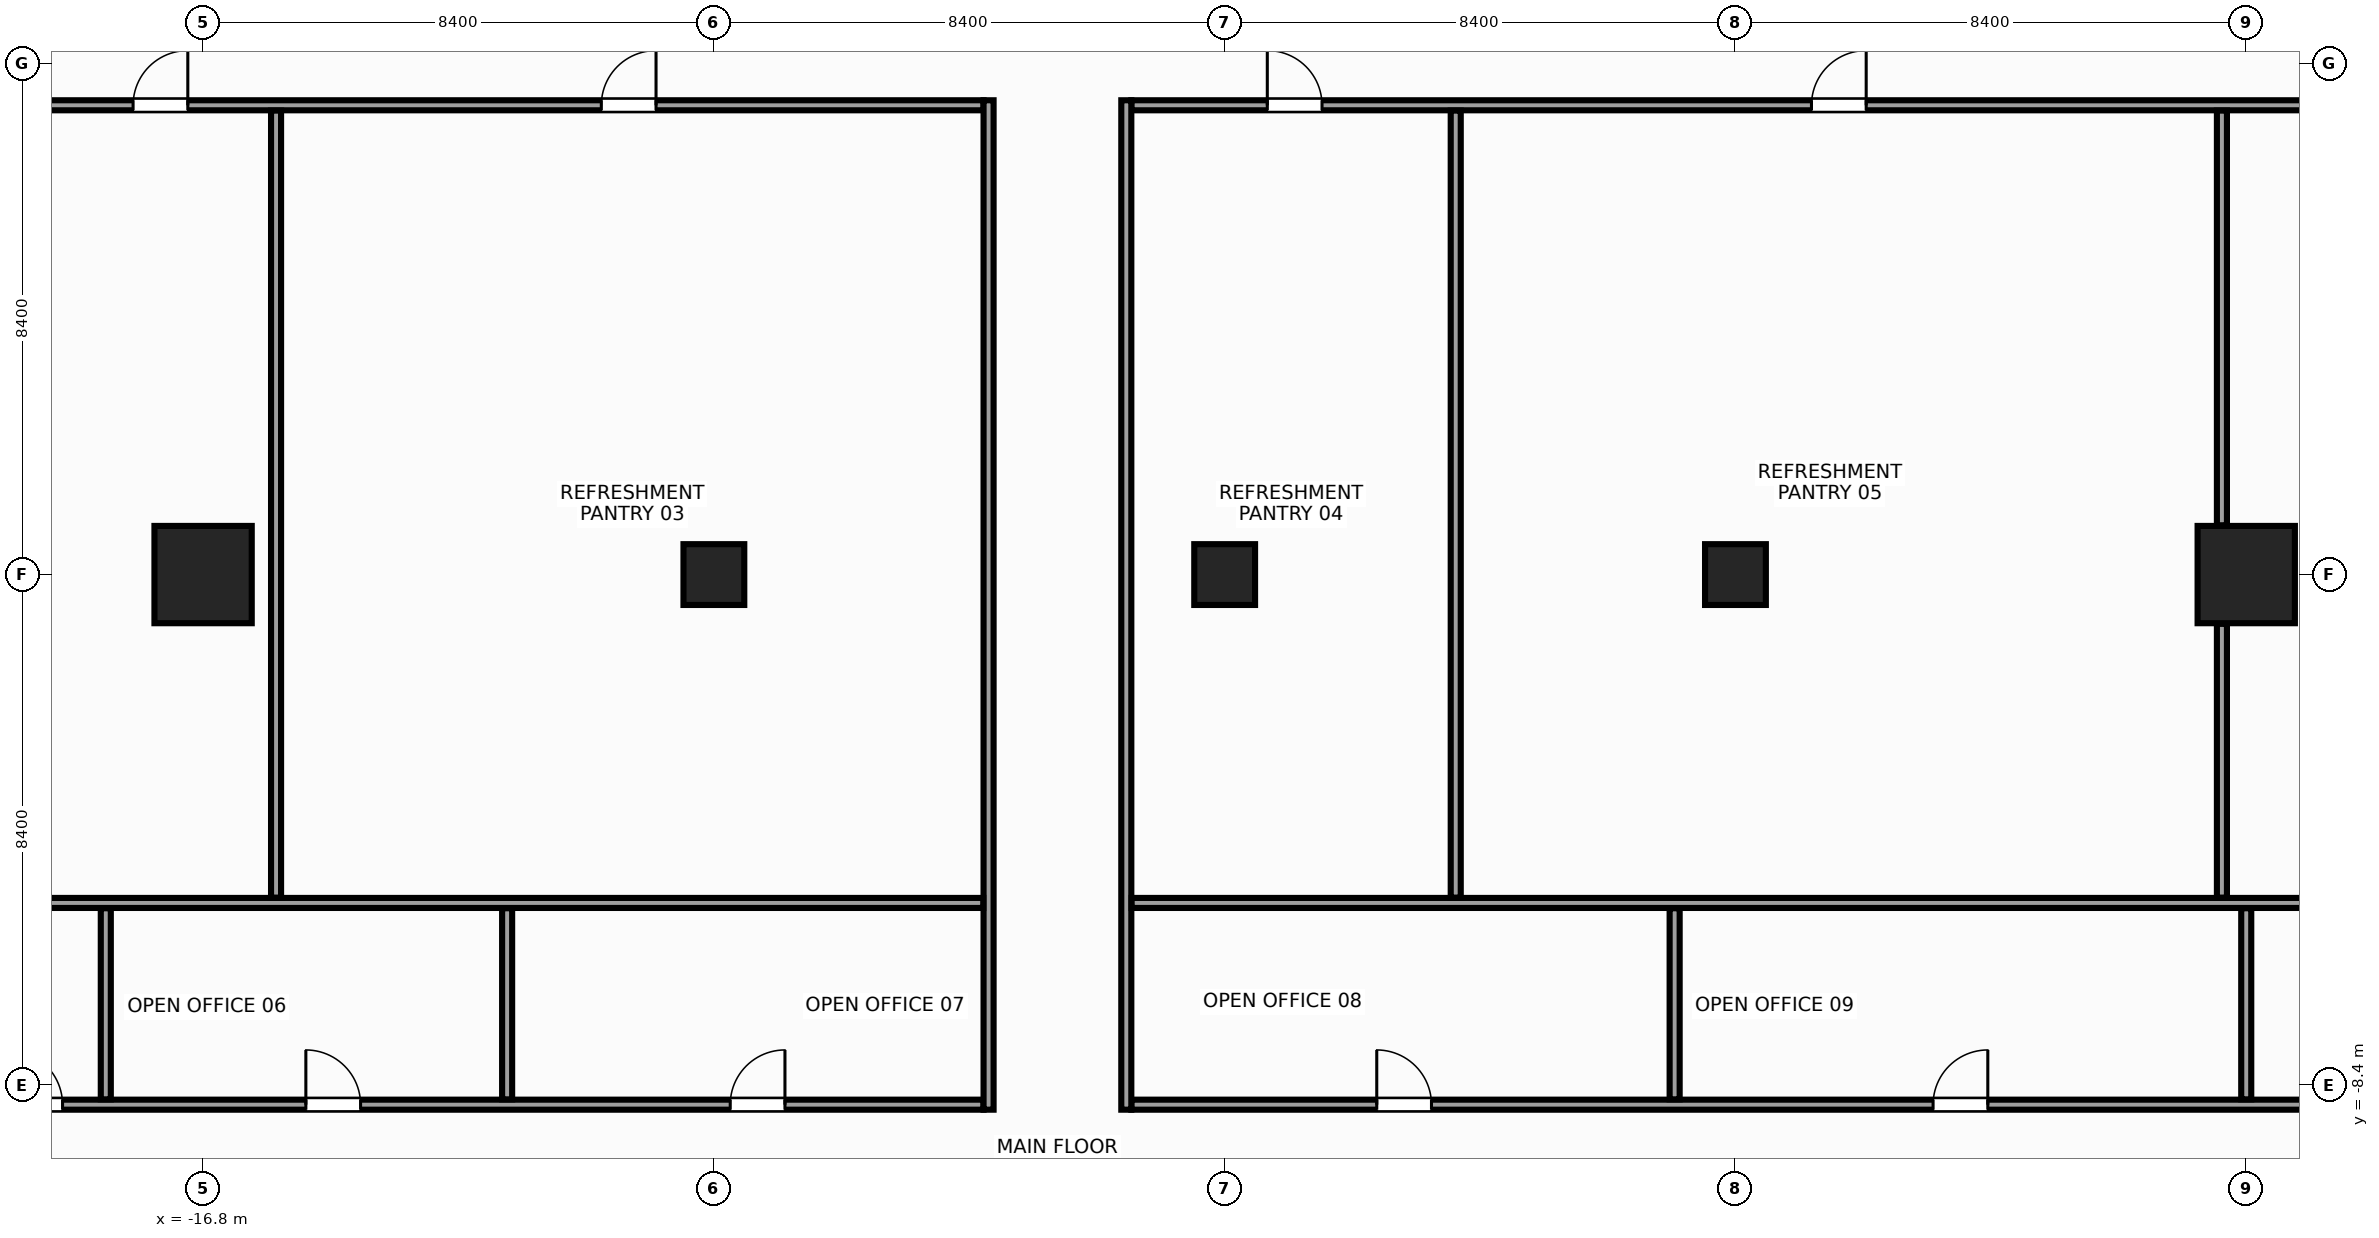
"""IFC4 building model, lengths in metres.
Left out: names, types, materials, properties, quantities, classifications, styles, units other than length and angle.
Written with IfcOpenShell. Run it as: python <this file> out.ifc"""

import sys

from ifc_helpers import new_model, si_unit, direction, frame, frame_2d, origin, origin_with_axes, origin_2d, place, context, subcontext, project, spatial, rectangle, hollow_rectangle, extrude, source, transform, mapped, element, fill, save


model = new_model("IFC4")
c1 = context("Model", 3, precision=1e-05, world=origin(), true_north=direction((0.0, 1.0)))
c2 = subcontext(c1, "Body", "Model", "MODEL_VIEW")
j1 = project(units=[si_unit("LENGTHUNIT", "METRE"), si_unit("PLANEANGLEUNIT", "RADIAN")], contexts=[c1])
p1 = place(None, origin())
s1 = spatial("IfcSite", under=j1, at=p1, CompositionType="ELEMENT")
p2 = place(p1, origin())
s2 = spatial("IfcBuilding", under=s1, at=p2, CompositionType="ELEMENT")
p3 = place(p2, frame((0.0, 0.0, 110.0)))
s3 = spatial("IfcBuildingStorey", under=s2, at=p3, CompositionType="ELEMENT", Elevation=110.0)
m1 = source(origin(), c2, "Body", "SweptSolid", [
    extrude(rectangle(XDim=1.6, YDim=1.6, at=origin_2d()), origin(), (0.0, 0.0, 1.0), 3.6),
])
for number, where, z_axis, x_axis in (
    (1, (-16.8, 0.0, 0.0), (0.0, 0.0, 1.0), (1.0, 0.0, 0.0)),
    (2, (16.8, 0.0, 0.0), (0.0, 0.0, 1.0), (1.0, 0.0, 0.0)),
):
    element("IfcColumn", number, at=place(p3, frame(where, z_axis=z_axis, x_axis=x_axis)), inside=s3, PredefinedType="COLUMN", context=c2, shape_type="MappedRepresentation", body=[
        mapped(m1, transform((0.0, 0.0, 0.0), x_axis=(1.0, 0.0, 0.0), y_axis=(0.0, 1.0, 0.0), z_axis=(0.0, 0.0, 1.0), scale=1.0)),
    ])
m2 = source(origin(), c2, "Body", "SweptSolid", [
    extrude(hollow_rectangle(XDim=1.0, YDim=1.0, WallThickness=0.045, at=origin_2d()), origin(), (0.0, 0.0, 1.0), 3.6),
])
for number, where, z_axis, x_axis in (
    (3, (-8.4, 0.0, 0.0), (0.0, 0.0, 1.0), (1.0, 0.0, 0.0)),
    (4, (8.4, 0.0, 0.0), (0.0, 0.0, 1.0), (1.0, 0.0, 0.0)),
):
    element("IfcColumn", number, at=place(p3, frame(where, z_axis=z_axis, x_axis=x_axis)), inside=s3, PredefinedType="COLUMN", context=c2, shape_type="MappedRepresentation", body=[
        mapped(m2, transform((0.0, 0.0, 0.0), x_axis=(1.0, 0.0, 0.0), y_axis=(0.0, 1.0, 0.0), z_axis=(0.0, 0.0, 1.0), scale=1.0)),
    ])
m3 = source(origin(), c2, "Body", "SweptSolid", [
    extrude(rectangle(XDim=1.0, YDim=1.0, at=origin_2d()), origin(), (0.0, 0.0, 1.0), 3.6),
])
p4 = place(p3, origin_with_axes())
e5 = element("IfcColumn", 5, at=p4, inside=s3, PredefinedType="COLUMN", context=c2, shape_type="MappedRepresentation", body=[
    mapped(m3, transform((0.0, 0.0, 0.0), x_axis=(1.0, 0.0, 0.0), y_axis=(0.0, 1.0, 0.0), z_axis=(0.0, 0.0, 1.0), scale=1.0)),
])
m4 = source(origin(), c2, "Body", "SweptSolid", [
    extrude(rectangle(XDim=16.8, YDim=0.165, at=frame_2d((8.4, 0.0))), origin(), (0.0, 0.0, 1.0), 2.745),
])
p5 = place(p3, frame((-20.765, 7.718, 0.0), z_axis=(0.0, 0.0, 1.0), x_axis=(1.0, 0.0, 0.0)))
e6 = element("IfcWall", 6, at=p5, inside=s3, PredefinedType="PARTITIONING", context=c2, shape_type="MappedRepresentation", body=[
    mapped(m4, transform((0.0, 0.0, 0.0), x_axis=(1.0, 0.0, 0.0), y_axis=(0.0, 1.0, 0.0), z_axis=(0.0, 0.0, 1.0), scale=1.0)),
])
p6 = place(p5, frame((2.814, 0.0, 0.0)))
e7 = element("IfcOpeningElement", 7, at=p6, cuts=e6, PredefinedType="OPENING", context=c2, shape_type="SweptSolid", body=[
    extrude(rectangle(XDim=0.9, YDim=2.15, at=frame_2d((0.45, 1.075))), frame((0.0, 0.094, 0.0), z_axis=(0.0, -1.0, 0.0), x_axis=(1.0, 0.0, 0.0)), (0.0, 0.0, 1.0), 0.189),
])
p7 = place(p5, frame((10.514, 0.0, 0.0)))
e8 = element("IfcOpeningElement", 8, at=p7, cuts=e6, PredefinedType="OPENING", context=c2, shape_type="SweptSolid", body=[
    extrude(rectangle(XDim=0.9, YDim=2.15, at=frame_2d((0.45, 1.075))), frame((0.0, 0.094, 0.0), z_axis=(0.0, -1.0, 0.0), x_axis=(1.0, 0.0, 0.0)), (0.0, 0.0, 1.0), 0.189),
])
m5 = source(origin(), c2, "Body", "SweptSolid", [
    extrude(rectangle(XDim=22.3, YDim=0.165, at=frame_2d((11.15, 0.0))), origin(), (0.0, 0.0, 1.0), 2.745),
])
p8 = place(p3, frame((-1.535, 7.718, 0.0), z_axis=(0.0, 0.0, 1.0), x_axis=(1.0, 0.0, 0.0)))
e9 = element("IfcWall", 9, at=p8, inside=s3, PredefinedType="PARTITIONING", context=c2, shape_type="MappedRepresentation", body=[
    mapped(m5, transform((0.0, 0.0, 0.0), x_axis=(1.0, 0.0, 0.0), y_axis=(0.0, 1.0, 0.0), z_axis=(0.0, 0.0, 1.0), scale=1.0)),
])
p9 = place(p8, frame((19.646, 0.0, 0.0)))
e10 = element("IfcOpeningElement", 10, at=p9, cuts=e9, PredefinedType="OPENING", context=c2, shape_type="SweptSolid", body=[
    extrude(rectangle(XDim=0.9, YDim=2.15, at=frame_2d((0.45, 1.075))), frame((0.0, 0.094, 0.0), z_axis=(0.0, -1.0, 0.0), x_axis=(1.0, 0.0, 0.0)), (0.0, 0.0, 1.0), 0.189),
])
p10 = place(p8, frame((2.236, 0.0, 0.0)))
e11 = element("IfcOpeningElement", 11, at=p10, cuts=e9, PredefinedType="OPENING", context=c2, shape_type="SweptSolid", body=[
    extrude(rectangle(XDim=0.9, YDim=2.15, at=frame_2d((0.45, 1.075))), frame((0.0, 0.094, 0.0), z_axis=(0.0, -1.0, 0.0), x_axis=(1.0, 0.0, 0.0)), (0.0, 0.0, 1.0), 0.189),
])
p11 = place(p8, frame((11.185, 0.0, 0.0)))
e12 = element("IfcOpeningElement", 12, at=p11, cuts=e9, PredefinedType="OPENING", context=c2, shape_type="SweptSolid", body=[
    extrude(rectangle(XDim=0.9, YDim=2.15, at=frame_2d((0.45, 1.075))), frame((0.0, 0.094, 0.0), z_axis=(0.0, -1.0, 0.0), x_axis=(1.0, 0.0, 0.0)), (0.0, 0.0, 1.0), 0.189),
])
p12 = place(p3, frame((-20.765, -8.718, 0.0), z_axis=(0.0, 0.0, 1.0), x_axis=(1.0, 0.0, 0.0)))
e13 = element("IfcWall", 13, at=p12, inside=s3, PredefinedType="PARTITIONING", context=c2, shape_type="MappedRepresentation", body=[
    mapped(m4, transform((0.0, 0.0, 0.0), x_axis=(1.0, 0.0, 0.0), y_axis=(0.0, 1.0, 0.0), z_axis=(0.0, 0.0, 1.0), scale=1.0)),
])
p13 = place(p12, frame((5.655, 0.0, 0.0)))
e14 = element("IfcOpeningElement", 14, at=p13, cuts=e13, PredefinedType="OPENING", context=c2, shape_type="SweptSolid", body=[
    extrude(rectangle(XDim=0.9, YDim=2.15, at=frame_2d((0.45, 1.075))), frame((0.0, 0.094, 0.0), z_axis=(0.0, -1.0, 0.0), x_axis=(1.0, 0.0, 0.0)), (0.0, 0.0, 1.0), 0.189),
])
p14 = place(p12, frame((12.634, 0.0, 0.0)))
e15 = element("IfcOpeningElement", 15, at=p14, cuts=e13, PredefinedType="OPENING", context=c2, shape_type="SweptSolid", body=[
    extrude(rectangle(XDim=0.9, YDim=2.15, at=frame_2d((0.45, 1.075))), frame((0.0, 0.094, 0.0), z_axis=(0.0, -1.0, 0.0), x_axis=(1.0, 0.0, 0.0)), (0.0, 0.0, 1.0), 0.189),
])
p15 = place(p12, frame((0.754, 0.0, 0.0)))
e16 = element("IfcOpeningElement", 16, at=p15, cuts=e13, PredefinedType="OPENING", context=c2, shape_type="SweptSolid", body=[
    extrude(rectangle(XDim=0.9, YDim=2.15, at=frame_2d((0.45, 1.075))), frame((0.0, 0.094, 0.0), z_axis=(0.0, -1.0, 0.0), x_axis=(1.0, 0.0, 0.0)), (0.0, 0.0, 1.0), 0.189),
])
p16 = place(p3, frame((-1.535, -8.718, 0.0), z_axis=(0.0, 0.0, 1.0), x_axis=(1.0, 0.0, 0.0)))
e17 = element("IfcWall", 17, at=p16, inside=s3, PredefinedType="PARTITIONING", context=c2, shape_type="MappedRepresentation", body=[
    mapped(m5, transform((0.0, 0.0, 0.0), x_axis=(1.0, 0.0, 0.0), y_axis=(0.0, 1.0, 0.0), z_axis=(0.0, 0.0, 1.0), scale=1.0)),
])
p17 = place(p16, frame((4.036, 0.0, 0.0)))
e18 = element("IfcOpeningElement", 18, at=p17, cuts=e17, PredefinedType="OPENING", context=c2, shape_type="SweptSolid", body=[
    extrude(rectangle(XDim=0.9, YDim=2.15, at=frame_2d((0.45, 1.075))), frame((0.0, 0.094, 0.0), z_axis=(0.0, -1.0, 0.0), x_axis=(1.0, 0.0, 0.0)), (0.0, 0.0, 1.0), 0.189),
])
p18 = place(p16, frame((13.185, 0.0, 0.0)))
e19 = element("IfcOpeningElement", 19, at=p18, cuts=e17, PredefinedType="OPENING", context=c2, shape_type="SweptSolid", body=[
    extrude(rectangle(XDim=0.9, YDim=2.15, at=frame_2d((0.45, 1.075))), frame((0.0, 0.094, 0.0), z_axis=(0.0, -1.0, 0.0), x_axis=(1.0, 0.0, 0.0)), (0.0, 0.0, 1.0), 0.189),
])
p19 = place(p16, frame((19.846, 0.0, 0.0)))
e20 = element("IfcOpeningElement", 20, at=p19, cuts=e17, PredefinedType="OPENING", context=c2, shape_type="SweptSolid", body=[
    extrude(rectangle(XDim=0.9, YDim=2.15, at=frame_2d((0.45, 1.075))), frame((0.0, 0.094, 0.0), z_axis=(0.0, -1.0, 0.0), x_axis=(1.0, 0.0, 0.0)), (0.0, 0.0, 1.0), 0.189),
])
m6 = source(origin(), c2, "Body", "SweptSolid", [
    extrude(rectangle(XDim=16.6, YDim=0.165, at=frame_2d((8.3, 0.0))), origin(), (0.0, 0.0, 1.0), 2.645),
])
for number, where, z_axis, x_axis in (
    (21, (-3.883, -8.8, 0.0), (0.0, 0.0, 1.0), (0.0, 1.0, 0.0)),
    (22, (-1.617, -8.8, 0.0), (0.0, 0.0, 1.0), (0.0, 1.0, 0.0)),
):
    element("IfcWall", number, at=place(p3, frame(where, z_axis=z_axis, x_axis=x_axis)), inside=s3, PredefinedType="PARTITIONING", context=c2, shape_type="MappedRepresentation", body=[
        mapped(m6, transform((0.0, 0.0, 0.0), x_axis=(1.0, 0.0, 0.0), y_axis=(0.0, 1.0, 0.0), z_axis=(0.0, 0.0, 1.0), scale=1.0)),
    ])
m7 = source(origin(), c2, "Body", "SweptSolid", [
    extrude(rectangle(XDim=21.38, YDim=0.165, at=frame_2d((10.69, 0.0))), origin(), (0.0, 0.0, 1.0), 2.745),
])
p20 = place(p3, frame((-25.35, -5.4, 0.0), z_axis=(0.0, 0.0, 1.0), x_axis=(1.0, 0.0, 0.0)))
e23 = element("IfcWall", 23, at=p20, inside=s3, PredefinedType="PARTITIONING", context=c2, shape_type="MappedRepresentation", body=[
    mapped(m7, transform((0.0, 0.0, 0.0), x_axis=(1.0, 0.0, 0.0), y_axis=(0.0, 1.0, 0.0), z_axis=(0.0, 0.0, 1.0), scale=1.0)),
])
m8 = source(origin(), c2, "Body", "SweptSolid", [
    extrude(rectangle(XDim=26.88, YDim=0.165, at=frame_2d((13.44, 0.0))), origin(), (0.0, 0.0, 1.0), 2.745),
])
p21 = place(p3, frame((-1.53, -5.4, 0.0), z_axis=(0.0, 0.0, 1.0), x_axis=(1.0, 0.0, 0.0)))
e24 = element("IfcWall", 24, at=p21, inside=s3, PredefinedType="PARTITIONING", context=c2, shape_type="MappedRepresentation", body=[
    mapped(m8, transform((0.0, 0.0, 0.0), x_axis=(1.0, 0.0, 0.0), y_axis=(0.0, 1.0, 0.0), z_axis=(0.0, 0.0, 1.0), scale=1.0)),
])
m9 = source(origin(), c2, "Body", "SweptSolid", [
    extrude(rectangle(XDim=12.942, YDim=0.165, at=frame_2d((6.471, 0.0))), origin(), (0.0, 0.0, 1.0), 2.645),
])
for number, where, z_axis, x_axis in (
    (25, (-15.6, -5.312, 0.0), (0.0, 0.0, 1.0), (0.0, 1.0, 0.0)),
    (26, (3.8, -5.312, 0.0), (0.0, 0.0, 1.0), (0.0, 1.0, 0.0)),
):
    element("IfcWall", number, at=place(p3, frame(where, z_axis=z_axis, x_axis=x_axis)), inside=s3, PredefinedType="PARTITIONING", context=c2, shape_type="MappedRepresentation", body=[
        mapped(m9, transform((0.0, 0.0, 0.0), x_axis=(1.0, 0.0, 0.0), y_axis=(0.0, 1.0, 0.0), z_axis=(0.0, 0.0, 1.0), scale=1.0)),
    ])
m10 = source(origin(), c2, "Body", "SweptSolid", [
    extrude(rectangle(XDim=4.502, YDim=0.165, at=frame_2d((2.251, 0.0))), origin(), (0.0, 0.0, 1.0), 3.36),
])
p22 = place(p3, frame((16.4, -5.312, 0.0), z_axis=(0.0, 0.0, 1.0), x_axis=(0.0, 1.0, 0.0)))
e27 = element("IfcWall", 27, at=p22, inside=s3, PredefinedType="PARTITIONING", context=c2, shape_type="MappedRepresentation", body=[
    mapped(m10, transform((0.0, 0.0, 0.0), x_axis=(1.0, 0.0, 0.0), y_axis=(0.0, 1.0, 0.0), z_axis=(0.0, 0.0, 1.0), scale=1.0)),
])
m11 = source(origin(), c2, "Body", "SweptSolid", [
    extrude(rectangle(XDim=6.82, YDim=0.165, at=frame_2d((3.41, 0.0))), origin(), (0.0, 0.0, 1.0), 2.645),
])
p23 = place(p3, frame((16.4, 0.81, 0.0), z_axis=(0.0, 0.0, 1.0), x_axis=(0.0, 1.0, 0.0)))
e28 = element("IfcWall", 28, at=p23, inside=s3, PredefinedType="PARTITIONING", context=c2, shape_type="MappedRepresentation", body=[
    mapped(m11, transform((0.0, 0.0, 0.0), x_axis=(1.0, 0.0, 0.0), y_axis=(0.0, 1.0, 0.0), z_axis=(0.0, 0.0, 1.0), scale=1.0)),
])
m12 = source(origin(), c2, "Body", "SweptSolid", [
    extrude(rectangle(XDim=3.142, YDim=0.165, at=frame_2d((1.571, 0.0))), origin(), (0.0, 0.0, 1.0), 3.36),
])
for number, where, z_axis, x_axis in (
    (29, (-18.4, -8.63, 0.0), (0.0, 0.0, 1.0), (0.0, 1.0, 0.0)),
    (30, (-11.8, -8.63, 0.0), (0.0, 0.0, 1.0), (0.0, 1.0, 0.0)),
    (31, (7.4, -8.63, 0.0), (0.0, 0.0, 1.0), (0.0, 1.0, 0.0)),
):
    element("IfcWall", number, at=place(p3, frame(where, z_axis=z_axis, x_axis=x_axis)), inside=s3, PredefinedType="PARTITIONING", context=c2, shape_type="MappedRepresentation", body=[
        mapped(m12, transform((0.0, 0.0, 0.0), x_axis=(1.0, 0.0, 0.0), y_axis=(0.0, 1.0, 0.0), z_axis=(0.0, 0.0, 1.0), scale=1.0)),
    ])
m13 = source(origin(), c2, "Body", "SweptSolid", [
    extrude(rectangle(XDim=3.142, YDim=0.165, at=frame_2d((1.571, 0.0))), origin(), (0.0, 0.0, 1.0), 2.745),
])
p24 = place(p3, frame((16.8, -8.63, 0.0), z_axis=(0.0, 0.0, 1.0), x_axis=(0.0, 1.0, 0.0)))
e32 = element("IfcWall", 32, at=p24, inside=s3, PredefinedType="PARTITIONING", context=c2, shape_type="MappedRepresentation", body=[
    mapped(m13, transform((0.0, 0.0, 0.0), x_axis=(1.0, 0.0, 0.0), y_axis=(0.0, 1.0, 0.0), z_axis=(0.0, 0.0, 1.0), scale=1.0)),
])
m14 = source(origin(), c2, "Body", "SweptSolid", [
    extrude(rectangle(XDim=0.9, YDim=2.15, at=frame_2d((0.45, 1.075))), frame((0.0, 0.025, 0.0), z_axis=(0.0, -1.0, 0.0), x_axis=(1.0, 0.0, 0.0)), (0.0, 0.0, 1.0), 0.05),
])
p25 = place(p6, origin())
e33 = element("IfcDoor", 33, at=p25, inside=s3, OperationType="SINGLE_SWING_RIGHT", PredefinedType="DOOR", context=c2, shape_type="MappedRepresentation", body=[
    mapped(m14, transform((0.0, 0.0, 0.0), x_axis=(1.0, 0.0, 0.0), y_axis=(0.0, 1.0, 0.0), z_axis=(0.0, 0.0, 1.0), scale=1.0)),
])
fill(e7, e33)
p26 = place(p7, origin())
e34 = element("IfcDoor", 34, at=p26, inside=s3, OperationType="SINGLE_SWING_RIGHT", PredefinedType="DOOR", context=c2, shape_type="MappedRepresentation", body=[
    mapped(m14, transform((0.0, 0.0, 0.0), x_axis=(1.0, 0.0, 0.0), y_axis=(0.0, 1.0, 0.0), z_axis=(0.0, 0.0, 1.0), scale=1.0)),
])
fill(e8, e34)
p27 = place(p10, origin())
e35 = element("IfcDoor", 35, at=p27, inside=s3, OperationType="SINGLE_SWING_LEFT", PredefinedType="DOOR", context=c2, shape_type="MappedRepresentation", body=[
    mapped(m14, transform((0.0, 0.0, 0.0), x_axis=(1.0, 0.0, 0.0), y_axis=(0.0, 1.0, 0.0), z_axis=(0.0, 0.0, 1.0), scale=1.0)),
])
fill(e11, e35)
p28 = place(p11, origin())
e36 = element("IfcDoor", 36, at=p28, inside=s3, OperationType="SINGLE_SWING_RIGHT", PredefinedType="DOOR", context=c2, shape_type="MappedRepresentation", body=[
    mapped(m14, transform((0.0, 0.0, 0.0), x_axis=(1.0, 0.0, 0.0), y_axis=(0.0, 1.0, 0.0), z_axis=(0.0, 0.0, 1.0), scale=1.0)),
])
fill(e12, e36)
p29 = place(p13, origin())
e37 = element("IfcDoor", 37, at=p29, inside=s3, OperationType="SINGLE_SWING_LEFT", PredefinedType="DOOR", context=c2, shape_type="MappedRepresentation", body=[
    mapped(m14, transform((0.0, 0.0, 0.0), x_axis=(1.0, 0.0, 0.0), y_axis=(0.0, 1.0, 0.0), z_axis=(0.0, 0.0, 1.0), scale=1.0)),
])
fill(e14, e37)
p30 = place(p14, origin())
e38 = element("IfcDoor", 38, at=p30, inside=s3, OperationType="SINGLE_SWING_RIGHT", PredefinedType="DOOR", context=c2, shape_type="MappedRepresentation", body=[
    mapped(m14, transform((0.0, 0.0, 0.0), x_axis=(1.0, 0.0, 0.0), y_axis=(0.0, 1.0, 0.0), z_axis=(0.0, 0.0, 1.0), scale=1.0)),
])
fill(e15, e38)
p31 = place(p17, origin())
e39 = element("IfcDoor", 39, at=p31, inside=s3, OperationType="SINGLE_SWING_LEFT", PredefinedType="DOOR", context=c2, shape_type="MappedRepresentation", body=[
    mapped(m14, transform((0.0, 0.0, 0.0), x_axis=(1.0, 0.0, 0.0), y_axis=(0.0, 1.0, 0.0), z_axis=(0.0, 0.0, 1.0), scale=1.0)),
])
fill(e18, e39)
p32 = place(p18, origin())
e40 = element("IfcDoor", 40, at=p32, inside=s3, OperationType="SINGLE_SWING_RIGHT", PredefinedType="DOOR", context=c2, shape_type="MappedRepresentation", body=[
    mapped(m14, transform((0.0, 0.0, 0.0), x_axis=(1.0, 0.0, 0.0), y_axis=(0.0, 1.0, 0.0), z_axis=(0.0, 0.0, 1.0), scale=1.0)),
])
fill(e19, e40)
p33 = place(p15, origin())
e41 = element("IfcDoor", 41, at=p33, inside=s3, OperationType="SINGLE_SWING_LEFT", PredefinedType="DOOR", context=c2, shape_type="MappedRepresentation", body=[
    mapped(m14, transform((0.0, 0.0, 0.0), x_axis=(1.0, 0.0, 0.0), y_axis=(0.0, 1.0, 0.0), z_axis=(0.0, 0.0, 1.0), scale=1.0)),
])
fill(e16, e41)
save(model, sys.argv[1])
